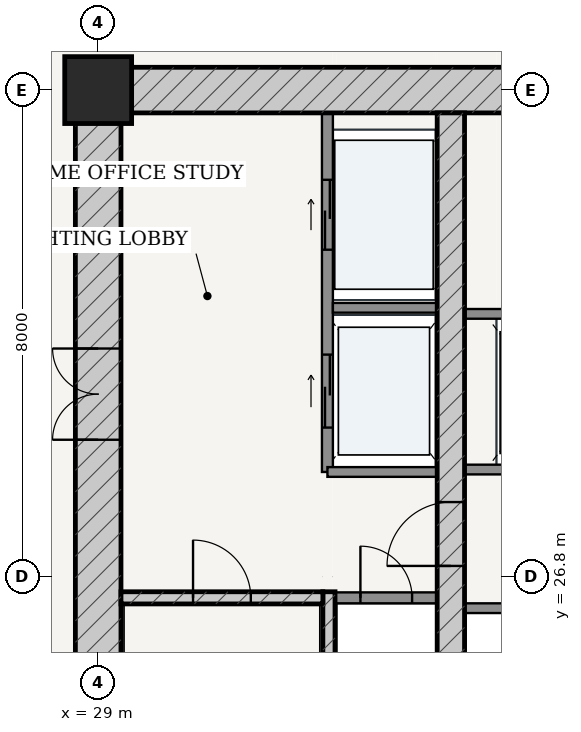
"""IFC4 building model, lengths in metres.
Left out: names, types, materials, properties, quantities, classifications, styles, units other than length and angle.
Written with IfcOpenShell. Run it as: python <this file> out.ifc"""

import sys

from ifc_helpers import new_model, si_unit, direction, frame, frame_2d, origin, origin_2d, place, context, subcontext, project, spatial, rectangle, extrude, source, transform, mapped, element, fill, save


model = new_model("IFC4")
c1 = context("Model", 3, precision=1e-05, world=origin(), true_north=direction((-0.2419218956, 0.970295726276)))
c2 = subcontext(c1, "Body", "Model", "MODEL_VIEW")
j1 = project(units=[si_unit("LENGTHUNIT", "METRE"), si_unit("PLANEANGLEUNIT", "RADIAN")], contexts=[c1])
p1 = place(None, origin())
s1 = spatial("IfcSite", under=j1, at=p1, CompositionType="ELEMENT")
p2 = place(p1, origin())
s2 = spatial("IfcBuilding", under=s1, at=p2, CompositionType="ELEMENT")
p3 = place(p2, frame((0.0, 0.0, 34.8)))
s3 = spatial("IfcBuildingStorey", under=s2, at=p3, CompositionType="ELEMENT", Elevation=34.8)
p4 = place(p3, frame((29.0, 34.8, 0.0), z_axis=(0.0, 0.0, 1.0), x_axis=(1.0, 0.0, 0.0)))
e1 = element("IfcColumn", 1, at=p4, inside=s3, PredefinedType="COLUMN", context=c2, shape_type="SweptSolid", body=[
    extrude(rectangle(XDim=1.1, YDim=1.1, at=origin_2d()), origin(), (0.0, 0.0, 1.0), 3.6),
])
p5 = place(p3, frame((28.625, 34.8, 0.0), z_axis=(0.0, 0.0, 1.0), x_axis=(1.0, 0.0, 0.0)))
e2 = element("IfcWall", 2, at=p5, inside=s3, PredefinedType="SHEAR", context=c2, shape_type="SweptSolid", body=[
    extrude(rectangle(XDim=18.75, YDim=0.75, at=frame_2d((9.375, 0.0))), origin(), (0.0, 0.0, 1.0), 3.32),
])
p6 = place(p5, frame((7.407, 0.0, 0.0)))
e3 = element("IfcOpeningElement", 3, at=p6, cuts=e2, PredefinedType="OPENING", context=c2, shape_type="SweptSolid", body=[
    extrude(rectangle(XDim=0.86, YDim=2.1, at=frame_2d((0.43, 1.05))), frame((0.0, 0.385, 0.0), z_axis=(0.0, -1.0, 0.0), x_axis=(1.0, 0.0, 0.0)), (0.0, 0.0, 1.0), 0.77),
])
p7 = place(p5, frame((10.488, 0.0, 0.0)))
e4 = element("IfcOpeningElement", 4, at=p7, cuts=e2, PredefinedType="OPENING", context=c2, shape_type="SweptSolid", body=[
    extrude(rectangle(XDim=0.85, YDim=2.1, at=frame_2d((0.425, 1.05))), frame((0.0, 0.385, 0.0), z_axis=(0.0, -1.0, 0.0), x_axis=(1.0, 0.0, 0.0)), (0.0, 0.0, 1.0), 0.77),
])
p8 = place(p3, frame((29.0, 19.175, 0.0), z_axis=(0.0, 0.0, 1.0), x_axis=(0.0, 1.0, 0.0)))
e5 = element("IfcWall", 5, at=p8, inside=s3, PredefinedType="SHEAR", context=c2, shape_type="SweptSolid", body=[
    extrude(rectangle(XDim=15.25, YDim=0.75, at=frame_2d((7.625, 0.0))), origin(), (0.0, 0.0, 1.0), 3.32),
])
p9 = place(p8, frame((9.875, 0.0, 0.0)))
e6 = element("IfcOpeningElement", 6, at=p9, cuts=e5, PredefinedType="OPENING", context=c2, shape_type="SweptSolid", body=[
    extrude(rectangle(XDim=1.5, YDim=2.2, at=frame_2d((0.75, 1.1))), frame((0.0, 0.385, 0.0), z_axis=(0.0, -1.0, 0.0), x_axis=(1.0, 0.0, 0.0)), (0.0, 0.0, 1.0), 0.77),
])
p10 = place(p3, frame((32.795, 19.175, 0.0), z_axis=(0.0, 0.0, 1.0), x_axis=(0.0, 1.0, 0.0)))
e7 = element("IfcWall", 7, at=p10, inside=s3, PredefinedType="SOLIDWALL", context=c2, shape_type="SweptSolid", body=[
    extrude(rectangle(XDim=7.375, YDim=0.2, at=frame_2d((3.688, 0.0))), origin(), (0.0, 0.0, 1.0), 3.32),
])
p11 = place(p3, frame((29.375, 26.45, 0.0), z_axis=(0.0, 0.0, 1.0), x_axis=(1.0, 0.0, 0.0)))
e8 = element("IfcWall", 8, at=p11, inside=s3, PredefinedType="SOLIDWALL", context=c2, shape_type="SweptSolid", body=[
    extrude(rectangle(XDim=3.32, YDim=0.2, at=frame_2d((1.66, 0.0))), origin(), (0.0, 0.0, 1.0), 3.32),
])
p12 = place(p11, frame((1.185, 0.0, 0.0)))
e9 = element("IfcOpeningElement", 9, at=p12, cuts=e8, PredefinedType="OPENING", context=c2, shape_type="SweptSolid", body=[
    extrude(rectangle(XDim=0.95, YDim=2.15, at=frame_2d((0.475, 1.075))), frame((0.0, 0.11, 0.0), z_axis=(0.0, -1.0, 0.0), x_axis=(1.0, 0.0, 0.0)), (0.0, 0.0, 1.0), 0.22),
])
p13 = place(p3, frame((34.8, 19.175, 0.0), z_axis=(0.0, 0.0, 1.0), x_axis=(0.0, 1.0, 0.0)))
e10 = element("IfcWall", 10, at=p13, inside=s3, PredefinedType="SHEAR", context=c2, shape_type="SweptSolid", body=[
    extrude(rectangle(XDim=15.25, YDim=0.45, at=frame_2d((7.625, 0.0))), origin(), (0.0, 0.0, 1.0), 3.32),
])
p14 = place(p13, frame((7.8, 0.0, 0.0)))
e11 = element("IfcOpeningElement", 11, at=p14, cuts=e10, PredefinedType="OPENING", context=c2, shape_type="SweptSolid", body=[
    extrude(rectangle(XDim=1.05, YDim=2.15, at=frame_2d((0.525, 1.075))), frame((0.0, 0.235, 0.0), z_axis=(0.0, -1.0, 0.0), x_axis=(1.0, 0.0, 0.0)), (0.0, 0.0, 1.0), 0.47),
])
p15 = place(p3, frame((32.9, 26.45, 0.0), z_axis=(0.0, 0.0, 1.0), x_axis=(1.0, 0.0, 0.0)))
e12 = element("IfcWall", 12, at=p15, inside=s3, PredefinedType="PARTITIONING", context=c2, shape_type="SweptSolid", body=[
    extrude(rectangle(XDim=1.675, YDim=0.18, at=frame_2d((0.837, 0.0))), origin(), (0.0, 0.0, 1.0), 3.32),
])
p16 = place(p15, frame((0.413, 0.0, 0.0)))
e13 = element("IfcOpeningElement", 13, at=p16, cuts=e12, PredefinedType="OPENING", context=c2, shape_type="SweptSolid", body=[
    extrude(rectangle(XDim=0.85, YDim=2.1, at=frame_2d((0.425, 1.05))), frame((0.0, 0.1, 0.0), z_axis=(0.0, -1.0, 0.0), x_axis=(1.0, 0.0, 0.0)), (0.0, 0.0, 1.0), 0.2),
])
p17 = place(p3, frame((32.77, 28.52, 0.0), z_axis=(0.0, 0.0, 1.0), x_axis=(0.0, 1.0, 0.0)))
e14 = element("IfcWall", 14, at=p17, inside=s3, PredefinedType="PARTITIONING", context=c2, shape_type="SweptSolid", body=[
    extrude(rectangle(XDim=5.905, YDim=0.18, at=frame_2d((2.953, 0.0))), origin(), (0.0, 0.0, 1.0), 3.32),
])
p18 = place(p17, frame((3.655, 0.0, 0.0)))
e15 = element("IfcOpeningElement", 15, at=p18, cuts=e14, PredefinedType="OPENING", context=c2, shape_type="SweptSolid", body=[
    extrude(rectangle(XDim=1.15, YDim=2.2, at=frame_2d((0.575, 1.1))), frame((0.0, 0.1, 0.0), z_axis=(0.0, -1.0, 0.0), x_axis=(1.0, 0.0, 0.0)), (0.0, 0.0, 1.0), 0.2),
])
p19 = place(p17, frame((0.73, 0.0, 0.0)))
e16 = element("IfcOpeningElement", 16, at=p19, cuts=e14, PredefinedType="OPENING", context=c2, shape_type="SweptSolid", body=[
    extrude(rectangle(XDim=1.2, YDim=2.25, at=frame_2d((0.6, 1.125))), frame((0.0, 0.1, 0.0), z_axis=(0.0, -1.0, 0.0), x_axis=(1.0, 0.0, 0.0)), (0.0, 0.0, 1.0), 0.2),
])
p20 = place(p3, frame((32.86, 31.22, 0.0), z_axis=(0.0, 0.0, 1.0), x_axis=(1.0, 0.0, 0.0)))
e17 = element("IfcWall", 17, at=p20, inside=s3, PredefinedType="PARTITIONING", context=c2, shape_type="SweptSolid", body=[
    extrude(rectangle(XDim=1.715, YDim=0.16, at=frame_2d((0.857, 0.0))), origin(), (0.0, 0.0, 1.0), 3.32),
])
p21 = place(p3, frame((32.77, 28.52, 0.0), z_axis=(0.0, 0.0, 1.0), x_axis=(1.0, 0.0, 0.0)))
e18 = element("IfcWall", 18, at=p21, inside=s3, PredefinedType="PARTITIONING", context=c2, shape_type="SweptSolid", body=[
    extrude(rectangle(XDim=1.805, YDim=0.16, at=frame_2d((0.902, 0.0))), origin(), (0.0, 0.0, 1.0), 3.32),
])
p22 = place(p3, frame((35.025, 28.56, 0.0), z_axis=(0.0, 0.0, 1.0), x_axis=(1.0, 0.0, 0.0)))
e19 = element("IfcWall", 19, at=p22, inside=s3, PredefinedType="PARTITIONING", context=c2, shape_type="SweptSolid", body=[
    extrude(rectangle(XDim=5.95, YDim=0.16, at=frame_2d((2.975, 0.0))), origin(), (0.0, 0.0, 1.0), 3.32),
])
p23 = place(p22, frame((0.76, 0.0, 0.0)))
e20 = element("IfcOpeningElement", 20, at=p23, cuts=e19, PredefinedType="OPENING", context=c2, shape_type="SweptSolid", body=[
    extrude(rectangle(XDim=1.1, YDim=2.2, at=frame_2d((0.55, 1.1))), frame((0.0, 0.09, 0.0), z_axis=(0.0, -1.0, 0.0), x_axis=(1.0, 0.0, 0.0)), (0.0, 0.0, 1.0), 0.18),
])
p24 = place(p22, frame((2.425, 0.0, 0.0)))
e21 = element("IfcOpeningElement", 21, at=p24, cuts=e19, PredefinedType="OPENING", context=c2, shape_type="SweptSolid", body=[
    extrude(rectangle(XDim=1.1, YDim=2.2, at=frame_2d((0.55, 1.1))), frame((0.0, 0.09, 0.0), z_axis=(0.0, -1.0, 0.0), x_axis=(1.0, 0.0, 0.0)), (0.0, 0.0, 1.0), 0.18),
])
p25 = place(p22, frame((4.09, 0.0, 0.0)))
e22 = element("IfcOpeningElement", 22, at=p25, cuts=e19, PredefinedType="OPENING", context=c2, shape_type="SweptSolid", body=[
    extrude(rectangle(XDim=1.1, YDim=2.2, at=frame_2d((0.55, 1.1))), frame((0.0, 0.09, 0.0), z_axis=(0.0, -1.0, 0.0), x_axis=(1.0, 0.0, 0.0)), (0.0, 0.0, 1.0), 0.18),
])
for number, where, z_axis, x_axis in (
    (23, (35.025, 31.12, 0.0), (0.0, 0.0, 1.0), (1.0, 0.0, 0.0)),
    (24, (35.025, 26.28, 0.0), (0.0, 0.0, 1.0), (1.0, 0.0, 0.0)),
):
    element("IfcWall", number, at=place(p3, frame(where, z_axis=z_axis, x_axis=x_axis)), inside=s3, PredefinedType="PARTITIONING", context=c2, shape_type="SweptSolid", body=[
        extrude(rectangle(XDim=5.95, YDim=0.16, at=frame_2d((2.975, 0.0))), origin(), (0.0, 0.0, 1.0), 3.32),
    ])
m1 = source(origin(), c2, "Body", "SweptSolid", [
    extrude(rectangle(XDim=1.5, YDim=2.2, at=frame_2d((0.75, 1.1))), frame((0.0, 0.025, 0.0), z_axis=(0.0, -1.0, 0.0), x_axis=(1.0, 0.0, 0.0)), (0.0, 0.0, 1.0), 0.05),
])
p26 = place(p9, origin())
e25 = element("IfcDoor", 25, at=p26, inside=s3, OperationType="DOUBLE_DOOR_SINGLE_SWING", PredefinedType="DOOR", context=c2, shape_type="MappedRepresentation", body=[
    mapped(m1, transform((0.0, 0.0, 0.0), scale=1.0)),
])
fill(e6, e25)
m2 = source(origin(), c2, "Body", "SweptSolid", [
    extrude(rectangle(XDim=1.05, YDim=2.15, at=frame_2d((0.525, 1.075))), frame((0.0, 0.025, 0.0), z_axis=(0.0, -1.0, 0.0), x_axis=(1.0, 0.0, 0.0)), (0.0, 0.0, 1.0), 0.05),
])
p27 = place(p14, origin())
e26 = element("IfcDoor", 26, at=p27, inside=s3, OperationType="SINGLE_SWING_LEFT", PredefinedType="DOOR", context=c2, shape_type="MappedRepresentation", body=[
    mapped(m2, transform((0.0, 0.0, 0.0), scale=1.0)),
])
fill(e11, e26)
m3 = source(origin(), c2, "Body", "SweptSolid", [
    extrude(rectangle(XDim=0.95, YDim=2.15, at=frame_2d((0.475, 1.075))), frame((0.0, 0.025, 0.0), z_axis=(0.0, -1.0, 0.0), x_axis=(1.0, 0.0, 0.0)), (0.0, 0.0, 1.0), 0.05),
])
p28 = place(p12, origin())
e27 = element("IfcDoor", 27, at=p28, inside=s3, OperationType="SINGLE_SWING_LEFT", PredefinedType="DOOR", context=c2, shape_type="MappedRepresentation", body=[
    mapped(m3, transform((0.0, 0.0, 0.0), scale=1.0)),
])
fill(e9, e27)
m4 = source(origin(), c2, "Body", "SweptSolid", [
    extrude(rectangle(XDim=0.85, YDim=2.1, at=frame_2d((0.425, 1.05))), frame((0.0, 0.025, 0.0), z_axis=(0.0, -1.0, 0.0), x_axis=(1.0, 0.0, 0.0)), (0.0, 0.0, 1.0), 0.05),
])
p29 = place(p16, origin())
e28 = element("IfcDoor", 28, at=p29, inside=s3, OperationType="SINGLE_SWING_LEFT", PredefinedType="DOOR", context=c2, shape_type="MappedRepresentation", body=[
    mapped(m4, transform((0.0, 0.0, 0.0), scale=1.0)),
])
fill(e13, e28)
m5 = source(origin(), c2, "Body", "SweptSolid", [
    extrude(rectangle(XDim=1.15, YDim=2.2, at=frame_2d((0.575, 1.1))), frame((0.0, 0.025, 0.0), z_axis=(0.0, -1.0, 0.0), x_axis=(1.0, 0.0, 0.0)), (0.0, 0.0, 1.0), 0.05),
])
p30 = place(p18, origin())
e29 = element("IfcDoor", 29, at=p30, inside=s3, OperationType="DOUBLE_DOOR_SLIDING", PredefinedType="DOOR", context=c2, shape_type="MappedRepresentation", body=[
    mapped(m5, transform((0.0, 0.0, 0.0), scale=1.0)),
])
fill(e15, e29)
m6 = source(origin(), c2, "Body", "SweptSolid", [
    extrude(rectangle(XDim=1.2, YDim=2.25, at=frame_2d((0.6, 1.125))), frame((0.0, 0.025, 0.0), z_axis=(0.0, -1.0, 0.0), x_axis=(1.0, 0.0, 0.0)), (0.0, 0.0, 1.0), 0.05),
])
p31 = place(p19, origin())
e30 = element("IfcDoor", 30, at=p31, inside=s3, OperationType="DOUBLE_DOOR_SLIDING", PredefinedType="DOOR", context=c2, shape_type="MappedRepresentation", body=[
    mapped(m6, transform((0.0, 0.0, 0.0), scale=1.0)),
])
fill(e16, e30)
save(model, sys.argv[1])
